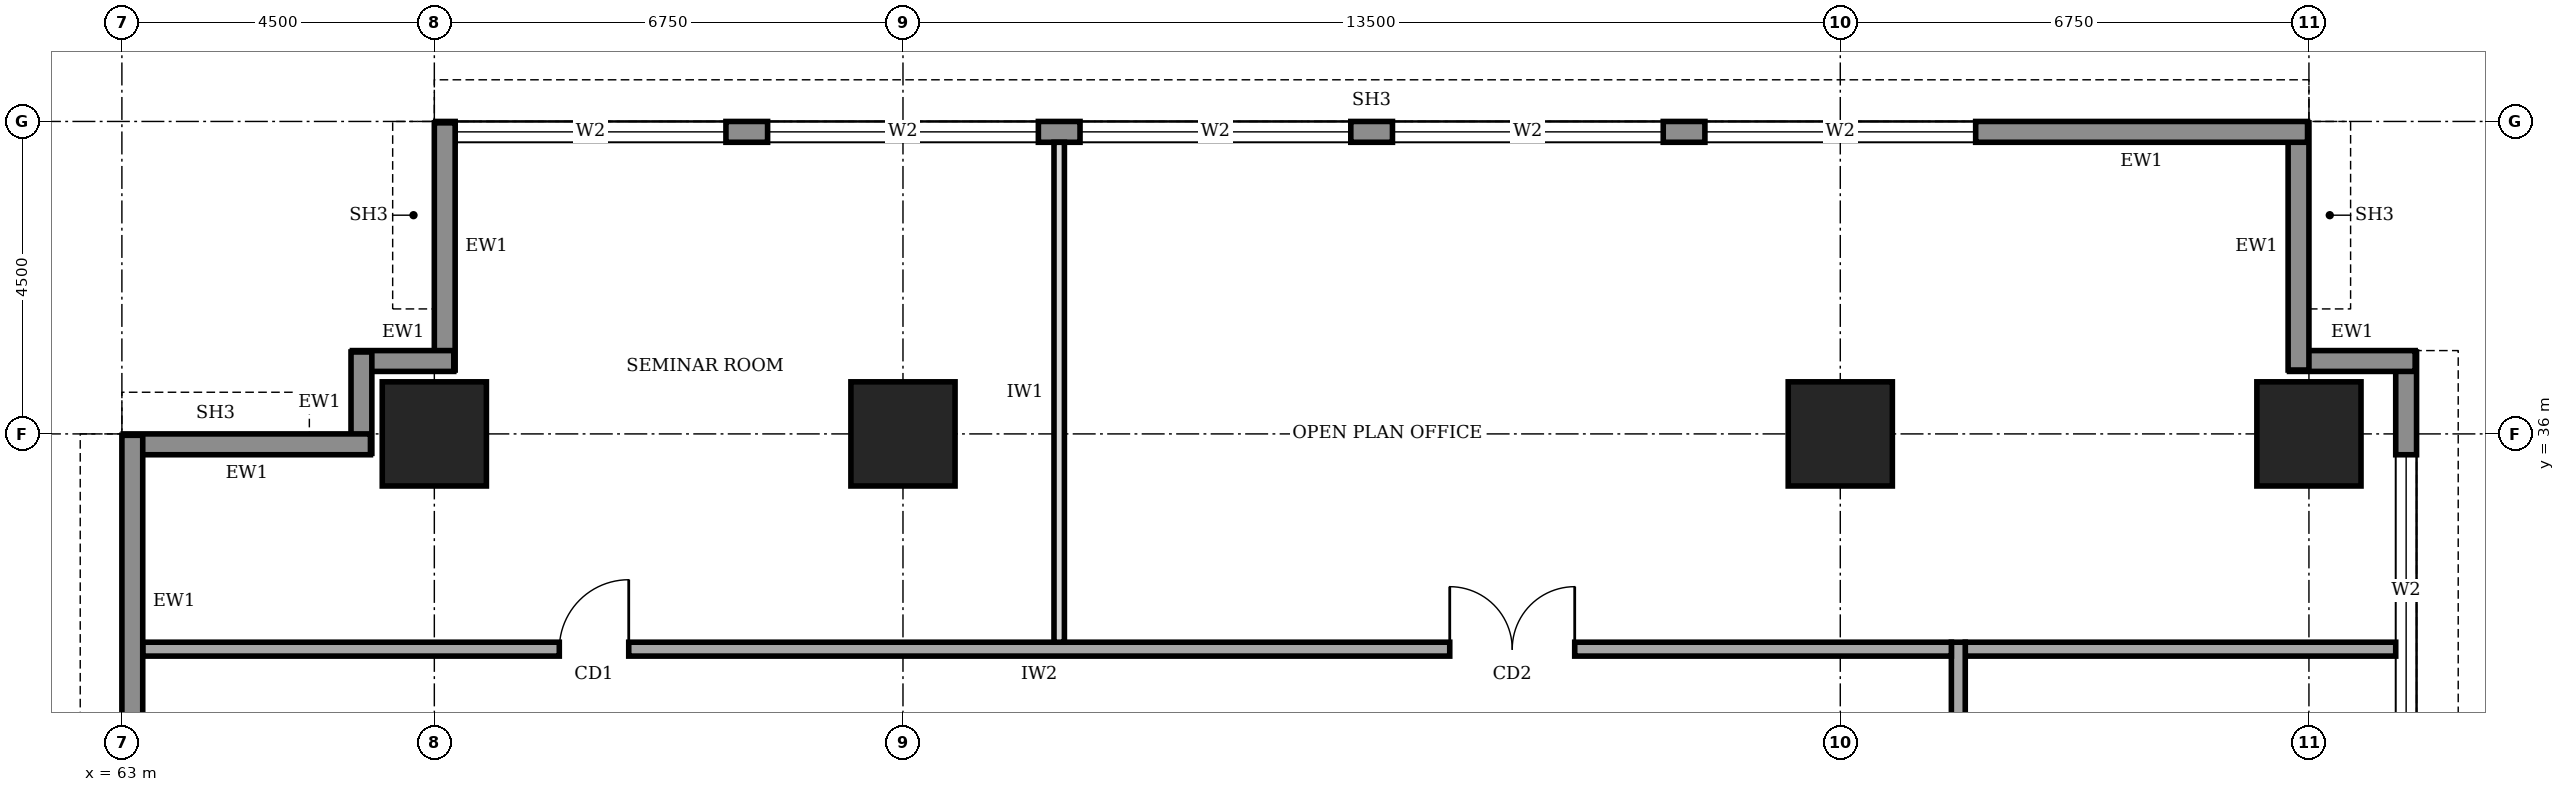
"""IFC4 building model, lengths in metres.
Left out: names, types, materials, properties, quantities, classifications, styles, units other than length and angle.
Written with IfcOpenShell. Run it as: python <this file> out.ifc"""

import sys

from ifc_helpers import new_model, si_unit, direction, frame, frame_2d, origin, origin_2d, place, context, subcontext, project, spatial, rectangle, extrude, element, fill, save


model = new_model("IFC4")
c1 = context("Model", 3, precision=1e-05, world=origin(), true_north=direction((0.0, 1.0)))
c2 = subcontext(c1, "Body", "Model", "MODEL_VIEW")
j1 = project(units=[si_unit("LENGTHUNIT", "METRE"), si_unit("PLANEANGLEUNIT", "RADIAN")], contexts=[c1])
p1 = place(None, origin())
s1 = spatial("IfcSite", under=j1, at=p1, CompositionType="ELEMENT")
p2 = place(p1, origin())
s2 = spatial("IfcBuilding", under=s1, at=p2, CompositionType="ELEMENT")
p3 = place(p2, frame((0.0, 0.0, 141.0)))
s3 = spatial("IfcBuildingStorey", under=s2, at=p3, CompositionType="ELEMENT", Elevation=141.0)
for number, where, z_axis, x_axis in (
    (1, (67.5, 36.0, 0.0), (0.0, 0.0, 1.0), (1.0, 0.0, 0.0)),
    (2, (74.25, 36.0, 0.0), (0.0, 0.0, 1.0), (1.0, 0.0, 0.0)),
    (3, (87.75, 36.0, 0.0), (0.0, 0.0, 1.0), (1.0, 0.0, 0.0)),
    (4, (94.5, 36.0, 0.0), (0.0, 0.0, 1.0), (1.0, 0.0, 0.0)),
):
    element("IfcColumn", number, at=place(p3, frame(where, z_axis=z_axis, x_axis=x_axis)), inside=s3, PredefinedType="COLUMN", context=c2, shape_type="SweptSolid", body=[
        extrude(rectangle(XDim=1.5, YDim=1.5, at=origin_2d()), origin(), (0.0, 0.0, 1.0), 4.0),
    ])
p4 = place(p3, frame((95.9, 3.32, 0.0), z_axis=(0.0, 0.0, 1.0), x_axis=(0.0, 1.0, 0.0)))
e5 = element("IfcWall", 5, at=p4, inside=s3, PredefinedType="STANDARD", context=c2, shape_type="SweptSolid", body=[
    extrude(rectangle(XDim=33.86, YDim=0.3, at=frame_2d((16.93, 0.0))), origin(), (0.0, 0.0, 1.0), 3.75),
])
p5 = place(p4, frame((1.48, 0.0, 0.6)))
e6 = element("IfcOpeningElement", 6, at=p5, cuts=e5, PredefinedType="OPENING", context=c2, shape_type="SweptSolid", body=[
    extrude(rectangle(XDim=3.9, YDim=2.6, at=frame_2d((1.95, 1.3))), frame((0.0, 0.16, 0.0), z_axis=(0.0, -1.0, 0.0), x_axis=(1.0, 0.0, 0.0)), (0.0, 0.0, 1.0), 0.32),
])
p6 = place(p4, frame((5.98, 0.0, 0.6)))
e7 = element("IfcOpeningElement", 7, at=p6, cuts=e5, PredefinedType="OPENING", context=c2, shape_type="SweptSolid", body=[
    extrude(rectangle(XDim=3.9, YDim=2.6, at=frame_2d((1.95, 1.3))), frame((0.0, 0.16, 0.0), z_axis=(0.0, -1.0, 0.0), x_axis=(1.0, 0.0, 0.0)), (0.0, 0.0, 1.0), 0.32),
])
p7 = place(p4, frame((10.48, 0.0, 0.6)))
e8 = element("IfcOpeningElement", 8, at=p7, cuts=e5, PredefinedType="OPENING", context=c2, shape_type="SweptSolid", body=[
    extrude(rectangle(XDim=3.9, YDim=2.6, at=frame_2d((1.95, 1.3))), frame((0.0, 0.16, 0.0), z_axis=(0.0, -1.0, 0.0), x_axis=(1.0, 0.0, 0.0)), (0.0, 0.0, 1.0), 0.32),
])
p8 = place(p4, frame((14.98, 0.0, 0.6)))
e9 = element("IfcOpeningElement", 9, at=p8, cuts=e5, PredefinedType="OPENING", context=c2, shape_type="SweptSolid", body=[
    extrude(rectangle(XDim=3.9, YDim=2.6, at=frame_2d((1.95, 1.3))), frame((0.0, 0.16, 0.0), z_axis=(0.0, -1.0, 0.0), x_axis=(1.0, 0.0, 0.0)), (0.0, 0.0, 1.0), 0.32),
])
p9 = place(p4, frame((19.48, 0.0, 0.6)))
e10 = element("IfcOpeningElement", 10, at=p9, cuts=e5, PredefinedType="OPENING", context=c2, shape_type="SweptSolid", body=[
    extrude(rectangle(XDim=3.9, YDim=2.6, at=frame_2d((1.95, 1.3))), frame((0.0, 0.16, 0.0), z_axis=(0.0, -1.0, 0.0), x_axis=(1.0, 0.0, 0.0)), (0.0, 0.0, 1.0), 0.32),
])
p10 = place(p4, frame((23.98, 0.0, 0.6)))
e11 = element("IfcOpeningElement", 11, at=p10, cuts=e5, PredefinedType="OPENING", context=c2, shape_type="SweptSolid", body=[
    extrude(rectangle(XDim=3.9, YDim=2.6, at=frame_2d((1.95, 1.3))), frame((0.0, 0.16, 0.0), z_axis=(0.0, -1.0, 0.0), x_axis=(1.0, 0.0, 0.0)), (0.0, 0.0, 1.0), 0.32),
])
p11 = place(p4, frame((28.48, 0.0, 0.6)))
e12 = element("IfcOpeningElement", 12, at=p11, cuts=e5, PredefinedType="OPENING", context=c2, shape_type="SweptSolid", body=[
    extrude(rectangle(XDim=3.9, YDim=2.6, at=frame_2d((1.95, 1.3))), frame((0.0, 0.16, 0.0), z_axis=(0.0, -1.0, 0.0), x_axis=(1.0, 0.0, 0.0)), (0.0, 0.0, 1.0), 0.32),
])
p12 = place(p3, frame((96.03, 37.05, 0.0), z_axis=(0.0, 0.0, 1.0), x_axis=(-1.0, 0.0, 0.0)))
e13 = element("IfcWall", 13, at=p12, inside=s3, PredefinedType="STANDARD", context=c2, shape_type="SweptSolid", body=[
    extrude(rectangle(XDim=1.81, YDim=0.3, at=frame_2d((0.905, 0.0))), origin(), (0.0, 0.0, 1.0), 3.75),
])
p13 = place(p3, frame((94.35, 36.92, 0.0), z_axis=(0.0, 0.0, 1.0), x_axis=(0.0, 1.0, 0.0)))
e14 = element("IfcWall", 14, at=p13, inside=s3, PredefinedType="STANDARD", context=c2, shape_type="SweptSolid", body=[
    extrude(rectangle(XDim=3.56, YDim=0.3, at=frame_2d((1.78, 0.0))), origin(), (0.0, 0.0, 1.0), 2.85),
])
p14 = place(p3, frame((94.48, 40.35, 0.0), z_axis=(0.0, 0.0, 1.0), x_axis=(-1.0, 0.0, 0.0)))
e15 = element("IfcWall", 15, at=p14, inside=s3, PredefinedType="STANDARD", context=c2, shape_type="SweptSolid", body=[
    extrude(rectangle(XDim=26.96, YDim=0.3, at=frame_2d((13.48, 0.0))), origin(), (0.0, 0.0, 1.0), 3.75),
])
p15 = place(p14, frame((22.78, 0.0, 0.6)))
e16 = element("IfcOpeningElement", 16, at=p15, cuts=e15, PredefinedType="OPENING", context=c2, shape_type="SweptSolid", body=[
    extrude(rectangle(XDim=3.9, YDim=2.6, at=frame_2d((1.95, 1.3))), frame((0.0, 0.16, 0.0), z_axis=(0.0, -1.0, 0.0), x_axis=(1.0, 0.0, 0.0)), (0.0, 0.0, 1.0), 0.32),
])
p16 = place(p14, frame((18.28, 0.0, 0.6)))
e17 = element("IfcOpeningElement", 17, at=p16, cuts=e15, PredefinedType="OPENING", context=c2, shape_type="SweptSolid", body=[
    extrude(rectangle(XDim=3.9, YDim=2.6, at=frame_2d((1.95, 1.3))), frame((0.0, 0.16, 0.0), z_axis=(0.0, -1.0, 0.0), x_axis=(1.0, 0.0, 0.0)), (0.0, 0.0, 1.0), 0.32),
])
p17 = place(p14, frame((13.78, 0.0, 0.6)))
e18 = element("IfcOpeningElement", 18, at=p17, cuts=e15, PredefinedType="OPENING", context=c2, shape_type="SweptSolid", body=[
    extrude(rectangle(XDim=3.9, YDim=2.6, at=frame_2d((1.95, 1.3))), frame((0.0, 0.16, 0.0), z_axis=(0.0, -1.0, 0.0), x_axis=(1.0, 0.0, 0.0)), (0.0, 0.0, 1.0), 0.32),
])
p18 = place(p14, frame((9.28, 0.0, 0.6)))
e19 = element("IfcOpeningElement", 19, at=p18, cuts=e15, PredefinedType="OPENING", context=c2, shape_type="SweptSolid", body=[
    extrude(rectangle(XDim=3.9, YDim=2.6, at=frame_2d((1.95, 1.3))), frame((0.0, 0.16, 0.0), z_axis=(0.0, -1.0, 0.0), x_axis=(1.0, 0.0, 0.0)), (0.0, 0.0, 1.0), 0.32),
])
p19 = place(p14, frame((4.78, 0.0, 0.6)))
e20 = element("IfcOpeningElement", 20, at=p19, cuts=e15, PredefinedType="OPENING", context=c2, shape_type="SweptSolid", body=[
    extrude(rectangle(XDim=3.9, YDim=2.6, at=frame_2d((1.95, 1.3))), frame((0.0, 0.16, 0.0), z_axis=(0.0, -1.0, 0.0), x_axis=(1.0, 0.0, 0.0)), (0.0, 0.0, 1.0), 0.32),
])
p20 = place(p3, frame((67.65, 40.48, 0.0), z_axis=(0.0, 0.0, 1.0), x_axis=(0.0, -1.0, 0.0)))
e21 = element("IfcWall", 21, at=p20, inside=s3, PredefinedType="STANDARD", context=c2, shape_type="SweptSolid", body=[
    extrude(rectangle(XDim=3.56, YDim=0.3, at=frame_2d((1.78, 0.0))), origin(), (0.0, 0.0, 1.0), 2.85),
])
for number, where, z_axis, x_axis in (
    (22, (67.78, 37.05, 0.0), (0.0, 0.0, 1.0), (-1.0, 0.0, 0.0)),
    (23, (66.45, 37.18, 0.0), (0.0, 0.0, 1.0), (0.0, -1.0, 0.0)),
):
    element("IfcWall", number, at=place(p3, frame(where, z_axis=z_axis, x_axis=x_axis)), inside=s3, PredefinedType="STANDARD", context=c2, shape_type="SweptSolid", body=[
        extrude(rectangle(XDim=1.46, YDim=0.3, at=frame_2d((0.73, 0.0))), origin(), (0.0, 0.0, 1.0), 3.75),
    ])
p21 = place(p3, frame((66.58, 35.85, 0.0), z_axis=(0.0, 0.0, 1.0), x_axis=(-1.0, 0.0, 0.0)))
e24 = element("IfcWall", 24, at=p21, inside=s3, PredefinedType="STANDARD", context=c2, shape_type="SweptSolid", body=[
    extrude(rectangle(XDim=3.56, YDim=0.3, at=frame_2d((1.78, 0.0))), origin(), (0.0, 0.0, 1.0), 2.85),
])
p22 = place(p3, frame((63.15, 35.98, 0.0), z_axis=(0.0, 0.0, 1.0), x_axis=(0.0, -1.0, 0.0)))
e25 = element("IfcWall", 25, at=p22, inside=s3, PredefinedType="STANDARD", context=c2, shape_type="SweptSolid", body=[
    extrude(rectangle(XDim=31.46, YDim=0.3, at=frame_2d((15.73, 0.0))), origin(), (0.0, 0.0, 1.0), 3.75),
])
p23 = place(p22, frame((27.28, 0.0, 0.6)))
e26 = element("IfcOpeningElement", 26, at=p23, cuts=e25, PredefinedType="OPENING", context=c2, shape_type="SweptSolid", body=[
    extrude(rectangle(XDim=3.9, YDim=2.6, at=frame_2d((1.95, 1.3))), frame((0.0, 0.16, 0.0), z_axis=(0.0, -1.0, 0.0), x_axis=(1.0, 0.0, 0.0)), (0.0, 0.0, 1.0), 0.32),
])
p24 = place(p22, frame((22.78, 0.0, 0.6)))
e27 = element("IfcOpeningElement", 27, at=p24, cuts=e25, PredefinedType="OPENING", context=c2, shape_type="SweptSolid", body=[
    extrude(rectangle(XDim=3.9, YDim=2.6, at=frame_2d((1.95, 1.3))), frame((0.0, 0.16, 0.0), z_axis=(0.0, -1.0, 0.0), x_axis=(1.0, 0.0, 0.0)), (0.0, 0.0, 1.0), 0.32),
])
p25 = place(p22, frame((18.28, 0.0, 0.6)))
e28 = element("IfcOpeningElement", 28, at=p25, cuts=e25, PredefinedType="OPENING", context=c2, shape_type="SweptSolid", body=[
    extrude(rectangle(XDim=3.9, YDim=2.6, at=frame_2d((1.95, 1.3))), frame((0.0, 0.16, 0.0), z_axis=(0.0, -1.0, 0.0), x_axis=(1.0, 0.0, 0.0)), (0.0, 0.0, 1.0), 0.32),
])
p26 = place(p22, frame((13.78, 0.0, 0.6)))
e29 = element("IfcOpeningElement", 29, at=p26, cuts=e25, PredefinedType="OPENING", context=c2, shape_type="SweptSolid", body=[
    extrude(rectangle(XDim=3.9, YDim=2.6, at=frame_2d((1.95, 1.3))), frame((0.0, 0.16, 0.0), z_axis=(0.0, -1.0, 0.0), x_axis=(1.0, 0.0, 0.0)), (0.0, 0.0, 1.0), 0.32),
])
p27 = place(p22, frame((9.28, 0.0, 0.6)))
e30 = element("IfcOpeningElement", 30, at=p27, cuts=e25, PredefinedType="OPENING", context=c2, shape_type="SweptSolid", body=[
    extrude(rectangle(XDim=3.9, YDim=2.6, at=frame_2d((1.95, 1.3))), frame((0.0, 0.16, 0.0), z_axis=(0.0, -1.0, 0.0), x_axis=(1.0, 0.0, 0.0)), (0.0, 0.0, 1.0), 0.32),
])
p28 = place(p22, frame((4.78, 0.0, 0.6)))
e31 = element("IfcOpeningElement", 31, at=p28, cuts=e25, PredefinedType="OPENING", context=c2, shape_type="SweptSolid", body=[
    extrude(rectangle(XDim=3.9, YDim=2.6, at=frame_2d((1.95, 1.3))), frame((0.0, 0.16, 0.0), z_axis=(0.0, -1.0, 0.0), x_axis=(1.0, 0.0, 0.0)), (0.0, 0.0, 1.0), 0.32),
])
p29 = place(p3, frame((89.45, 9.2, 0.0), z_axis=(0.0, 0.0, 1.0), x_axis=(0.0, 1.0, 0.0)))
e32 = element("IfcWall", 32, at=p29, inside=s3, PredefinedType="SOLIDWALL", context=c2, shape_type="SweptSolid", body=[
    extrude(rectangle(XDim=23.8, YDim=0.2, at=frame_2d((11.9, 0.0))), origin(), (0.0, 0.0, 1.0), 3.75),
])
p30 = place(p29, frame((1.55, 0.0, 0.0)))
e33 = element("IfcOpeningElement", 33, at=p30, cuts=e32, PredefinedType="OPENING", context=c2, shape_type="SweptSolid", body=[
    extrude(rectangle(XDim=1.0, YDim=2.1, at=frame_2d((0.5, 1.05))), frame((0.0, 0.11, 0.0), z_axis=(0.0, -1.0, 0.0), x_axis=(1.0, 0.0, 0.0)), (0.0, 0.0, 1.0), 0.22),
])
p31 = place(p29, frame((5.55, 0.0, 0.0)))
e34 = element("IfcOpeningElement", 34, at=p31, cuts=e32, PredefinedType="OPENING", context=c2, shape_type="SweptSolid", body=[
    extrude(rectangle(XDim=0.9, YDim=2.1, at=frame_2d((0.45, 1.05))), frame((0.0, 0.11, 0.0), z_axis=(0.0, -1.0, 0.0), x_axis=(1.0, 0.0, 0.0)), (0.0, 0.0, 1.0), 0.22),
])
p32 = place(p29, frame((10.35, 0.0, 0.0)))
e35 = element("IfcOpeningElement", 35, at=p32, cuts=e32, PredefinedType="OPENING", context=c2, shape_type="SweptSolid", body=[
    extrude(rectangle(XDim=0.9, YDim=2.1, at=frame_2d((0.45, 1.05))), frame((0.0, 0.11, 0.0), z_axis=(0.0, -1.0, 0.0), x_axis=(1.0, 0.0, 0.0)), (0.0, 0.0, 1.0), 0.22),
])
p33 = place(p29, frame((13.4, 0.0, 0.0)))
e36 = element("IfcOpeningElement", 36, at=p33, cuts=e32, PredefinedType="OPENING", context=c2, shape_type="SweptSolid", body=[
    extrude(rectangle(XDim=0.9, YDim=2.1, at=frame_2d((0.45, 1.05))), frame((0.0, 0.11, 0.0), z_axis=(0.0, -1.0, 0.0), x_axis=(1.0, 0.0, 0.0)), (0.0, 0.0, 1.0), 0.22),
])
p34 = place(p29, frame((16.3, 0.0, 0.0)))
e37 = element("IfcOpeningElement", 37, at=p34, cuts=e32, PredefinedType="OPENING", context=c2, shape_type="SweptSolid", body=[
    extrude(rectangle(XDim=1.0, YDim=2.1, at=frame_2d((0.5, 1.05))), frame((0.0, 0.11, 0.0), z_axis=(0.0, -1.0, 0.0), x_axis=(1.0, 0.0, 0.0)), (0.0, 0.0, 1.0), 0.22),
])
p35 = place(p29, frame((8.2, 0.0, 0.0)))
e38 = element("IfcOpeningElement", 38, at=p35, cuts=e32, PredefinedType="OPENING", context=c2, shape_type="SweptSolid", body=[
    extrude(rectangle(XDim=1.0, YDim=2.1, at=frame_2d((0.5, 1.05))), frame((0.0, 0.11, 0.0), z_axis=(0.0, -1.0, 0.0), x_axis=(1.0, 0.0, 0.0)), (0.0, 0.0, 1.0), 0.22),
])
p36 = place(p29, frame((20.3, 0.0, 0.0)))
e39 = element("IfcOpeningElement", 39, at=p36, cuts=e32, PredefinedType="OPENING", context=c2, shape_type="SweptSolid", body=[
    extrude(rectangle(XDim=1.0, YDim=2.1, at=frame_2d((0.5, 1.05))), frame((0.0, 0.11, 0.0), z_axis=(0.0, -1.0, 0.0), x_axis=(1.0, 0.0, 0.0)), (0.0, 0.0, 1.0), 0.22),
])
p37 = place(p3, frame((89.35, 32.9, 0.0), z_axis=(0.0, 0.0, 1.0), x_axis=(-1.0, 0.0, 0.0)))
e40 = element("IfcWall", 40, at=p37, inside=s3, PredefinedType="SOLIDWALL", context=c2, shape_type="SweptSolid", body=[
    extrude(rectangle(XDim=26.05, YDim=0.2, at=frame_2d((13.025, 0.0))), origin(), (0.0, 0.0, 1.0), 3.75),
])
p38 = place(p37, frame((19.05, 0.0, 0.0)))
e41 = element("IfcOpeningElement", 41, at=p38, cuts=e40, PredefinedType="OPENING", context=c2, shape_type="SweptSolid", body=[
    extrude(rectangle(XDim=1.0, YDim=2.1, at=frame_2d((0.5, 1.05))), frame((0.0, 0.11, 0.0), z_axis=(0.0, -1.0, 0.0), x_axis=(1.0, 0.0, 0.0)), (0.0, 0.0, 1.0), 0.22),
])
p39 = place(p37, frame((5.425, 0.0, 0.0)))
e42 = element("IfcOpeningElement", 42, at=p39, cuts=e40, PredefinedType="OPENING", context=c2, shape_type="SweptSolid", body=[
    extrude(rectangle(XDim=1.8, YDim=2.1, at=frame_2d((0.9, 1.05))), frame((0.0, 0.11, 0.0), z_axis=(0.0, -1.0, 0.0), x_axis=(1.0, 0.0, 0.0)), (0.0, 0.0, 1.0), 0.22),
])
p40 = place(p3, frame((89.55, 32.9, 0.0), z_axis=(0.0, 0.0, 1.0), x_axis=(1.0, 0.0, 0.0)))
e43 = element("IfcWall", 43, at=p40, inside=s3, PredefinedType="SOLIDWALL", context=c2, shape_type="SweptSolid", body=[
    extrude(rectangle(XDim=6.2, YDim=0.2, at=frame_2d((3.1, 0.0))), origin(), (0.0, 0.0, 1.0), 3.75),
])
p41 = place(p3, frame((76.5, 33.0, 0.0), z_axis=(0.0, 0.0, 1.0), x_axis=(0.0, 1.0, 0.0)))
e44 = element("IfcWall", 44, at=p41, inside=s3, PredefinedType="PARTITIONING", context=c2, shape_type="SweptSolid", body=[
    extrude(rectangle(XDim=7.2, YDim=0.15, at=frame_2d((3.6, 0.0))), origin(), (0.0, 0.0, 1.0), 3.75),
])
p42 = place(p11, origin())
e45 = element("IfcWindow", 45, at=p42, inside=s3, PartitioningType="SINGLE_PANEL", PredefinedType="WINDOW", context=c2, shape_type="SweptSolid", body=[
    extrude(rectangle(XDim=3.9, YDim=2.6, at=frame_2d((1.95, 1.3))), frame((0.0, 0.03, 0.0), z_axis=(0.0, -1.0, 0.0), x_axis=(1.0, 0.0, 0.0)), (0.0, 0.0, 1.0), 0.06),
])
fill(e12, e45)
p43 = place(p15, origin())
e46 = element("IfcWindow", 46, at=p43, inside=s3, PartitioningType="SINGLE_PANEL", PredefinedType="WINDOW", context=c2, shape_type="SweptSolid", body=[
    extrude(rectangle(XDim=3.9, YDim=2.6, at=frame_2d((1.95, 1.3))), frame((0.0, 0.03, 0.0), z_axis=(0.0, -1.0, 0.0), x_axis=(1.0, 0.0, 0.0)), (0.0, 0.0, 1.0), 0.06),
])
fill(e16, e46)
p44 = place(p16, origin())
e47 = element("IfcWindow", 47, at=p44, inside=s3, PartitioningType="SINGLE_PANEL", PredefinedType="WINDOW", context=c2, shape_type="SweptSolid", body=[
    extrude(rectangle(XDim=3.9, YDim=2.6, at=frame_2d((1.95, 1.3))), frame((0.0, 0.03, 0.0), z_axis=(0.0, -1.0, 0.0), x_axis=(1.0, 0.0, 0.0)), (0.0, 0.0, 1.0), 0.06),
])
fill(e17, e47)
p45 = place(p17, origin())
e48 = element("IfcWindow", 48, at=p45, inside=s3, PartitioningType="SINGLE_PANEL", PredefinedType="WINDOW", context=c2, shape_type="SweptSolid", body=[
    extrude(rectangle(XDim=3.9, YDim=2.6, at=frame_2d((1.95, 1.3))), frame((0.0, 0.03, 0.0), z_axis=(0.0, -1.0, 0.0), x_axis=(1.0, 0.0, 0.0)), (0.0, 0.0, 1.0), 0.06),
])
fill(e18, e48)
p46 = place(p18, origin())
e49 = element("IfcWindow", 49, at=p46, inside=s3, PartitioningType="SINGLE_PANEL", PredefinedType="WINDOW", context=c2, shape_type="SweptSolid", body=[
    extrude(rectangle(XDim=3.9, YDim=2.6, at=frame_2d((1.95, 1.3))), frame((0.0, 0.03, 0.0), z_axis=(0.0, -1.0, 0.0), x_axis=(1.0, 0.0, 0.0)), (0.0, 0.0, 1.0), 0.06),
])
fill(e19, e49)
p47 = place(p19, origin())
e50 = element("IfcWindow", 50, at=p47, inside=s3, PartitioningType="SINGLE_PANEL", PredefinedType="WINDOW", context=c2, shape_type="SweptSolid", body=[
    extrude(rectangle(XDim=3.9, YDim=2.6, at=frame_2d((1.95, 1.3))), frame((0.0, 0.03, 0.0), z_axis=(0.0, -1.0, 0.0), x_axis=(1.0, 0.0, 0.0)), (0.0, 0.0, 1.0), 0.06),
])
fill(e20, e50)
p48 = place(p38, frame((1.0, 0.0, 0.0), z_axis=(0.0, 0.0, 1.0), x_axis=(-1.0, 0.0, 0.0)))
e51 = element("IfcDoor", 51, at=p48, inside=s3, OperationType="SINGLE_SWING_RIGHT", PredefinedType="DOOR", context=c2, shape_type="SweptSolid", body=[
    extrude(rectangle(XDim=1.0, YDim=2.1, at=frame_2d((0.5, 1.05))), frame((0.0, 0.025, 0.0), z_axis=(0.0, -1.0, 0.0), x_axis=(1.0, 0.0, 0.0)), (0.0, 0.0, 1.0), 0.05),
])
fill(e41, e51)
p49 = place(p39, frame((1.8, 0.0, 0.0), z_axis=(0.0, 0.0, 1.0), x_axis=(-1.0, 0.0, 0.0)))
e52 = element("IfcDoor", 52, at=p49, inside=s3, OperationType="DOUBLE_DOOR_SINGLE_SWING", PredefinedType="DOOR", context=c2, shape_type="SweptSolid", body=[
    extrude(rectangle(XDim=1.8, YDim=2.1, at=frame_2d((0.9, 1.05))), frame((0.0, 0.025, 0.0), z_axis=(0.0, -1.0, 0.0), x_axis=(1.0, 0.0, 0.0)), (0.0, 0.0, 1.0), 0.05),
])
fill(e42, e52)
save(model, sys.argv[1])
